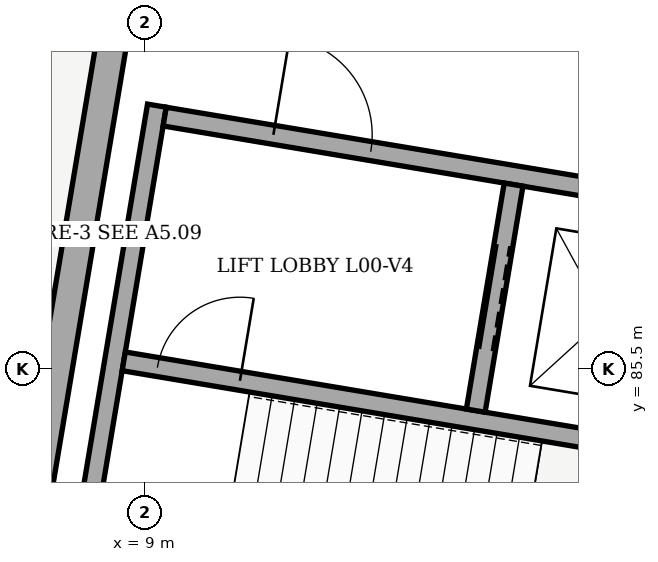
"""IFC4 building model, lengths in metres.
Left out: names, types, materials, properties, quantities, classifications, styles, units other than length and angle.
Written with IfcOpenShell. Run it as: python <this file> out.ifc"""

import sys

from ifc_helpers import new_model, si_unit, direction, frame, frame_2d, origin, origin_with_axes, place, context, subcontext, project, spatial, rectangle, extrude, element, fill, save


model = new_model("IFC4")
c1 = context("Model", 3, precision=1e-05, world=origin(), true_north=direction((0.0, 1.0)))
c2 = subcontext(c1, "Body", "Model", "MODEL_VIEW")
j1 = project(units=[si_unit("LENGTHUNIT", "METRE"), si_unit("PLANEANGLEUNIT", "RADIAN")], contexts=[c1])
p1 = place(None, origin())
s1 = spatial("IfcSite", under=j1, at=p1, CompositionType="ELEMENT")
p2 = place(p1, origin())
s2 = spatial("IfcBuilding", under=s1, at=p2, CompositionType="ELEMENT")
p3 = place(p2, origin())
s3 = spatial("IfcBuildingStorey", under=s2, at=p3, CompositionType="ELEMENT", Elevation=0.0)
p4 = place(p3, frame((7.101, 81.068, 0.0), z_axis=(0.0, 0.0, 1.0), x_axis=(0.165021285013, 0.986290005776, 0.0)))
e1 = element("IfcWall", 1, at=p4, inside=s3, PredefinedType="SOLIDWALL", context=c2, shape_type="SweptSolid", body=[
    extrude(rectangle(XDim=9.097, YDim=0.4, at=frame_2d((4.549, 0.0))), origin(), (0.0, 0.0, 1.0), 3.4),
])
p5 = place(p3, frame((7.856, 81.184, 0.0), z_axis=(0.0, 0.0, 1.0), x_axis=(0.165031598329, 0.986288280146, 0.0)))
e2 = element("IfcWall", 2, at=p5, inside=s3, PredefinedType="SHEAR", context=c2, shape_type="SweptSolid", body=[
    extrude(rectangle(XDim=7.885, YDim=0.25, at=frame_2d((3.942, 0.0))), origin(), (0.0, 0.0, 1.0), 4.54),
])
p6 = place(p3, frame((8.721, 85.597, 0.0), z_axis=(0.0, 0.0, 1.0), x_axis=(0.986286216974, -0.165043928115, 0.0)))
e3 = element("IfcWall", 3, at=p6, inside=s3, PredefinedType="SHEAR", context=c2, shape_type="SweptSolid", body=[
    extrude(rectangle(XDim=7.55, YDim=0.25, at=frame_2d((3.775, 0.0))), origin(), (0.0, 0.0, 1.0), 4.54),
])
p7 = place(p6, frame((0.45, 0.0, 0.0)))
e4 = element("IfcOpeningElement", 4, at=p7, cuts=e3, PredefinedType="OPENING", context=c2, shape_type="SweptSolid", body=[
    extrude(rectangle(XDim=1.1, YDim=2.15, at=frame_2d((0.55, 1.075))), frame((0.0, 0.135, 0.0), z_axis=(0.0, -1.0, 0.0), x_axis=(1.0, 0.0, 0.0)), (0.0, 0.0, 1.0), 0.27),
])
p8 = place(p3, frame((9.26, 88.817, 0.0), z_axis=(0.0, 0.0, 1.0), x_axis=(0.98628533611, -0.165049191984, 0.0)))
e5 = element("IfcWall", 5, at=p8, inside=s3, PredefinedType="SHEAR", context=c2, shape_type="SweptSolid", body=[
    extrude(rectangle(XDim=7.55, YDim=0.25, at=frame_2d((3.775, 0.0))), origin(), (0.0, 0.0, 1.0), 4.54),
])
p9 = place(p8, frame((1.45, 0.0, 0.0)))
e6 = element("IfcOpeningElement", 6, at=p9, cuts=e5, PredefinedType="OPENING", context=c2, shape_type="SweptSolid", body=[
    extrude(rectangle(XDim=1.3, YDim=2.15, at=frame_2d((0.65, 1.075))), frame((0.0, 0.135, 0.0), z_axis=(0.0, -1.0, 0.0), x_axis=(1.0, 0.0, 0.0)), (0.0, 0.0, 1.0), 0.27),
])
p10 = place(p3, frame((13.352, 84.948, 0.0), z_axis=(0.0, 0.0, 1.0), x_axis=(0.165029254052, 0.986288672401, 0.0)))
e7 = element("IfcWall", 7, at=p10, inside=s3, PredefinedType="SHEAR", context=c2, shape_type="SweptSolid", body=[
    extrude(rectangle(XDim=3.015, YDim=0.25, at=frame_2d((1.507, 0.0))), origin(), (0.0, 0.0, 1.0), 4.54),
])
p11 = place(p10, frame((0.808, 0.0, 0.0)))
e8 = element("IfcOpeningElement", 8, at=p11, cuts=e7, PredefinedType="OPENING", context=c2, shape_type="SweptSolid", body=[
    extrude(rectangle(XDim=1.4, YDim=2.15, at=frame_2d((0.7, 1.075))), frame((0.0, 0.135, 0.0), z_axis=(0.0, -1.0, 0.0), x_axis=(1.0, 0.0, 0.0)), (0.0, 0.0, 1.0), 0.27),
])
p12 = place(p3, frame((26.653, 88.847, 0.0), z_axis=(0.0, 0.0, 1.0), x_axis=(-0.986287135312, 0.165038440121, 0.0)))
e9 = element("IfcWall", 9, at=p12, inside=s3, PredefinedType="PARTITIONING", context=c2, shape_type="SweptSolid", body=[
    extrude(rectangle(XDim=17.83, YDim=0.13, at=frame_2d((8.915, 0.0))), origin(), (0.0, 0.0, 1.0), 3.38),
])
p13 = place(p12, frame((6.435, 0.0, 0.0)))
e10 = element("IfcOpeningElement", 10, at=p13, cuts=e9, PredefinedType="OPENING", context=c2, shape_type="SweptSolid", body=[
    extrude(rectangle(XDim=1.05, YDim=2.2, at=frame_2d((0.525, 1.1))), frame((0.0, 0.075, 0.0), z_axis=(0.0, -1.0, 0.0), x_axis=(1.0, 0.0, 0.0)), (0.0, 0.0, 1.0), 0.15),
])
p14 = place(p7, origin_with_axes())
e11 = element("IfcDoor", 11, at=p14, inside=s3, OperationType="SINGLE_SWING_RIGHT", PredefinedType="DOOR", context=c2, shape_type="SweptSolid", body=[
    extrude(rectangle(XDim=1.1, YDim=2.15, at=frame_2d((0.55, 1.075))), frame((0.0, 0.025, 0.0), z_axis=(0.0, -1.0, 0.0), x_axis=(1.0, 0.0, 0.0)), (0.0, 0.0, 1.0), 0.05),
])
fill(e4, e11)
p15 = place(p9, origin_with_axes())
e12 = element("IfcDoor", 12, at=p15, inside=s3, OperationType="SINGLE_SWING_LEFT", PredefinedType="DOOR", context=c2, shape_type="SweptSolid", body=[
    extrude(rectangle(XDim=1.3, YDim=2.15, at=frame_2d((0.65, 1.075))), frame((0.0, 0.025, 0.0), z_axis=(0.0, -1.0, 0.0), x_axis=(1.0, 0.0, 0.0)), (0.0, 0.0, 1.0), 0.05),
])
fill(e6, e12)
p16 = place(p11, origin_with_axes())
e13 = element("IfcDoor", 13, at=p16, inside=s3, OperationType="DOUBLE_DOOR_SLIDING", PredefinedType="DOOR", context=c2, shape_type="SweptSolid", body=[
    extrude(rectangle(XDim=1.4, YDim=2.15, at=frame_2d((0.7, 1.075))), frame((0.0, 0.025, 0.0), z_axis=(0.0, -1.0, 0.0), x_axis=(1.0, 0.0, 0.0)), (0.0, 0.0, 1.0), 0.05),
])
fill(e8, e13)
save(model, sys.argv[1])
